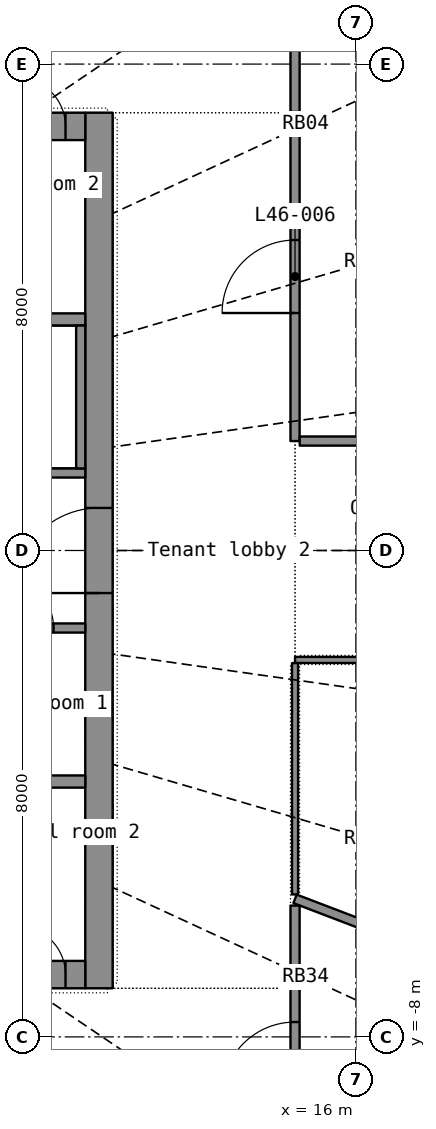
"""IFC4 building model, lengths in metres.
Left out: names, types, materials, properties, quantities, classifications, styles, units other than length and angle.
Written with IfcOpenShell. Run it as: python <this file> out.ifc"""

import sys

from ifc_helpers import new_model, si_unit, direction, frame, frame_2d, origin, place, context, subcontext, project, spatial, rectangle, extrude, element, fill, save


model = new_model("IFC4")
c1 = context("Model", 3, precision=1e-05, world=origin(), true_north=direction((0.0, 1.0)))
c2 = subcontext(c1, "Body", "Model", "MODEL_VIEW")
j1 = project(units=[si_unit("LENGTHUNIT", "METRE"), si_unit("PLANEANGLEUNIT", "RADIAN")], contexts=[c1])
p1 = place(None, origin())
s1 = spatial("IfcSite", under=j1, at=p1, CompositionType="ELEMENT")
p2 = place(p1, origin())
s2 = spatial("IfcBuilding", under=s1, at=p2, CompositionType="ELEMENT")
p3 = place(p2, frame((0.0, 0.0, 190.4)))
s3 = spatial("IfcBuildingStorey", under=s2, at=p3, CompositionType="ELEMENT", Elevation=190.4)
p4 = place(p3, frame((11.775, -7.2, 0.0), z_axis=(0.0, 0.0, 1.0), x_axis=(0.0, 1.0, 0.0)))
e1 = element("IfcWall", 1, at=p4, inside=s3, PredefinedType="SHEAR", context=c2, shape_type="SweptSolid", body=[
    extrude(rectangle(XDim=14.4, YDim=0.45, at=frame_2d((7.2, 0.0))), origin(), (0.0, 0.0, 1.0), 3.3),
])
p5 = place(p4, frame((6.5, 0.0, 0.0)))
e2 = element("IfcOpeningElement", 2, at=p5, cuts=e1, PredefinedType="OPENING", context=c2, shape_type="SweptSolid", body=[
    extrude(rectangle(XDim=1.4, YDim=2.2, at=frame_2d((0.7, 1.1))), frame((0.0, 0.235, 0.0), z_axis=(0.0, -1.0, 0.0), x_axis=(1.0, 0.0, 0.0)), (0.0, 0.0, 1.0), 0.47),
])
p6 = place(p3, frame((-11.55, -6.975, 0.0), z_axis=(0.0, 0.0, 1.0), x_axis=(1.0, 0.0, 0.0)))
e3 = element("IfcWall", 3, at=p6, inside=s3, PredefinedType="SHEAR", context=c2, shape_type="SweptSolid", body=[
    extrude(rectangle(XDim=23.1, YDim=0.45, at=frame_2d((11.55, 0.0))), origin(), (0.0, 0.0, 1.0), 3.3),
])
p7 = place(p6, frame((20.0, 0.0, 0.0)))
e4 = element("IfcOpeningElement", 4, at=p7, cuts=e3, PredefinedType="OPENING", context=c2, shape_type="SweptSolid", body=[
    extrude(rectangle(XDim=1.1, YDim=2.2, at=frame_2d((0.55, 1.1))), frame((0.0, 0.235, 0.0), z_axis=(0.0, -1.0, 0.0), x_axis=(1.0, 0.0, 0.0)), (0.0, 0.0, 1.0), 0.47),
])
p8 = place(p6, frame((3.1, 0.0, 0.0)))
e5 = element("IfcOpeningElement", 5, at=p8, cuts=e3, PredefinedType="OPENING", context=c2, shape_type="SweptSolid", body=[
    extrude(rectangle(XDim=0.9, YDim=2.1, at=frame_2d((0.45, 1.05))), frame((0.0, 0.235, 0.0), z_axis=(0.0, -1.0, 0.0), x_axis=(1.0, 0.0, 0.0)), (0.0, 0.0, 1.0), 0.47),
])
p9 = place(p6, frame((8.1, 0.0, 0.0)))
e6 = element("IfcOpeningElement", 6, at=p9, cuts=e3, PredefinedType="OPENING", context=c2, shape_type="SweptSolid", body=[
    extrude(rectangle(XDim=0.9, YDim=2.1, at=frame_2d((0.45, 1.05))), frame((0.0, 0.235, 0.0), z_axis=(0.0, -1.0, 0.0), x_axis=(1.0, 0.0, 0.0)), (0.0, 0.0, 1.0), 0.47),
])
p10 = place(p6, frame((15.1, 0.0, 0.0)))
e7 = element("IfcOpeningElement", 7, at=p10, cuts=e3, PredefinedType="OPENING", context=c2, shape_type="SweptSolid", body=[
    extrude(rectangle(XDim=0.9, YDim=2.1, at=frame_2d((0.45, 1.05))), frame((0.0, 0.235, 0.0), z_axis=(0.0, -1.0, 0.0), x_axis=(1.0, 0.0, 0.0)), (0.0, 0.0, 1.0), 0.47),
])
p11 = place(p6, frame((0.325, 0.0, 0.0)))
e8 = element("IfcOpeningElement", 8, at=p11, cuts=e3, PredefinedType="OPENING", context=c2, shape_type="SweptSolid", body=[
    extrude(rectangle(XDim=0.8, YDim=2.05, at=frame_2d((0.4, 1.025))), frame((0.0, 0.235, 0.0), z_axis=(0.0, -1.0, 0.0), x_axis=(1.0, 0.0, 0.0)), (0.0, 0.0, 1.0), 0.47),
])
p12 = place(p6, frame((21.975, 0.0, 0.0)))
e9 = element("IfcOpeningElement", 9, at=p12, cuts=e3, PredefinedType="OPENING", context=c2, shape_type="SweptSolid", body=[
    extrude(rectangle(XDim=0.8, YDim=2.05, at=frame_2d((0.4, 1.025))), frame((0.0, 0.235, 0.0), z_axis=(0.0, -1.0, 0.0), x_axis=(1.0, 0.0, 0.0)), (0.0, 0.0, 1.0), 0.47),
])
p13 = place(p3, frame((-11.55, 6.975, 0.0), z_axis=(0.0, 0.0, 1.0), x_axis=(1.0, 0.0, 0.0)))
e10 = element("IfcWall", 10, at=p13, inside=s3, PredefinedType="SHEAR", context=c2, shape_type="SweptSolid", body=[
    extrude(rectangle(XDim=23.1, YDim=0.45, at=frame_2d((11.55, 0.0))), origin(), (0.0, 0.0, 1.0), 3.3),
])
p14 = place(p13, frame((2.0, 0.0, 0.0)))
e11 = element("IfcOpeningElement", 11, at=p14, cuts=e10, PredefinedType="OPENING", context=c2, shape_type="SweptSolid", body=[
    extrude(rectangle(XDim=1.1, YDim=2.2, at=frame_2d((0.55, 1.1))), frame((0.0, 0.235, 0.0), z_axis=(0.0, -1.0, 0.0), x_axis=(1.0, 0.0, 0.0)), (0.0, 0.0, 1.0), 0.47),
])
p15 = place(p13, frame((6.0, 0.0, 0.0)))
e12 = element("IfcOpeningElement", 12, at=p15, cuts=e10, PredefinedType="OPENING", context=c2, shape_type="SweptSolid", body=[
    extrude(rectangle(XDim=1.1, YDim=2.2, at=frame_2d((0.55, 1.1))), frame((0.0, 0.235, 0.0), z_axis=(0.0, -1.0, 0.0), x_axis=(1.0, 0.0, 0.0)), (0.0, 0.0, 1.0), 0.47),
])
p16 = place(p13, frame((8.0, 0.0, 0.0)))
e13 = element("IfcOpeningElement", 13, at=p16, cuts=e10, PredefinedType="OPENING", context=c2, shape_type="SweptSolid", body=[
    extrude(rectangle(XDim=1.1, YDim=2.2, at=frame_2d((0.55, 1.1))), frame((0.0, 0.235, 0.0), z_axis=(0.0, -1.0, 0.0), x_axis=(1.0, 0.0, 0.0)), (0.0, 0.0, 1.0), 0.47),
])
p17 = place(p13, frame((10.0, 0.0, 0.0)))
e14 = element("IfcOpeningElement", 14, at=p17, cuts=e10, PredefinedType="OPENING", context=c2, shape_type="SweptSolid", body=[
    extrude(rectangle(XDim=1.1, YDim=2.2, at=frame_2d((0.55, 1.1))), frame((0.0, 0.235, 0.0), z_axis=(0.0, -1.0, 0.0), x_axis=(1.0, 0.0, 0.0)), (0.0, 0.0, 1.0), 0.47),
])
p18 = place(p13, frame((12.0, 0.0, 0.0)))
e15 = element("IfcOpeningElement", 15, at=p18, cuts=e10, PredefinedType="OPENING", context=c2, shape_type="SweptSolid", body=[
    extrude(rectangle(XDim=1.1, YDim=2.2, at=frame_2d((0.55, 1.1))), frame((0.0, 0.235, 0.0), z_axis=(0.0, -1.0, 0.0), x_axis=(1.0, 0.0, 0.0)), (0.0, 0.0, 1.0), 0.47),
])
p19 = place(p13, frame((14.0, 0.0, 0.0)))
e16 = element("IfcOpeningElement", 16, at=p19, cuts=e10, PredefinedType="OPENING", context=c2, shape_type="SweptSolid", body=[
    extrude(rectangle(XDim=1.1, YDim=2.2, at=frame_2d((0.55, 1.1))), frame((0.0, 0.235, 0.0), z_axis=(0.0, -1.0, 0.0), x_axis=(1.0, 0.0, 0.0)), (0.0, 0.0, 1.0), 0.47),
])
p20 = place(p13, frame((16.0, 0.0, 0.0)))
e17 = element("IfcOpeningElement", 17, at=p20, cuts=e10, PredefinedType="OPENING", context=c2, shape_type="SweptSolid", body=[
    extrude(rectangle(XDim=1.1, YDim=2.2, at=frame_2d((0.55, 1.1))), frame((0.0, 0.235, 0.0), z_axis=(0.0, -1.0, 0.0), x_axis=(1.0, 0.0, 0.0)), (0.0, 0.0, 1.0), 0.47),
])
p21 = place(p13, frame((18.0, 0.0, 0.0)))
e18 = element("IfcOpeningElement", 18, at=p21, cuts=e10, PredefinedType="OPENING", context=c2, shape_type="SweptSolid", body=[
    extrude(rectangle(XDim=1.1, YDim=2.2, at=frame_2d((0.55, 1.1))), frame((0.0, 0.235, 0.0), z_axis=(0.0, -1.0, 0.0), x_axis=(1.0, 0.0, 0.0)), (0.0, 0.0, 1.0), 0.47),
])
p22 = place(p13, frame((20.0, 0.0, 0.0)))
e19 = element("IfcOpeningElement", 19, at=p22, cuts=e10, PredefinedType="OPENING", context=c2, shape_type="SweptSolid", body=[
    extrude(rectangle(XDim=1.1, YDim=2.2, at=frame_2d((0.55, 1.1))), frame((0.0, 0.235, 0.0), z_axis=(0.0, -1.0, 0.0), x_axis=(1.0, 0.0, 0.0)), (0.0, 0.0, 1.0), 0.47),
])
p23 = place(p13, frame((4.1, 0.0, 0.0)))
e20 = element("IfcOpeningElement", 20, at=p23, cuts=e10, PredefinedType="OPENING", context=c2, shape_type="SweptSolid", body=[
    extrude(rectangle(XDim=0.9, YDim=2.1, at=frame_2d((0.45, 1.05))), frame((0.0, 0.235, 0.0), z_axis=(0.0, -1.0, 0.0), x_axis=(1.0, 0.0, 0.0)), (0.0, 0.0, 1.0), 0.47),
])
p24 = place(p13, frame((0.325, 0.0, 0.0)))
e21 = element("IfcOpeningElement", 21, at=p24, cuts=e10, PredefinedType="OPENING", context=c2, shape_type="SweptSolid", body=[
    extrude(rectangle(XDim=0.8, YDim=2.05, at=frame_2d((0.4, 1.025))), frame((0.0, 0.235, 0.0), z_axis=(0.0, -1.0, 0.0), x_axis=(1.0, 0.0, 0.0)), (0.0, 0.0, 1.0), 0.47),
])
p25 = place(p13, frame((21.975, 0.0, 0.0)))
e22 = element("IfcOpeningElement", 22, at=p25, cuts=e10, PredefinedType="OPENING", context=c2, shape_type="SweptSolid", body=[
    extrude(rectangle(XDim=0.8, YDim=2.05, at=frame_2d((0.4, 1.025))), frame((0.0, 0.235, 0.0), z_axis=(0.0, -1.0, 0.0), x_axis=(1.0, 0.0, 0.0)), (0.0, 0.0, 1.0), 0.47),
])
for number, where, z_axis, x_axis in (
    (23, (-11.55, -3.8, 0.0), (0.0, 0.0, 1.0), (1.0, 0.0, 0.0)),
    (24, (-11.55, 3.8, 0.0), (0.0, 0.0, 1.0), (1.0, 0.0, 0.0)),
):
    element("IfcWall", number, at=place(p3, frame(where, z_axis=z_axis, x_axis=x_axis)), inside=s3, PredefinedType="SHEAR", context=c2, shape_type="SweptSolid", body=[
        extrude(rectangle(XDim=23.1, YDim=0.2, at=frame_2d((11.55, 0.0))), origin(), (0.0, 0.0, 1.0), 3.3),
    ])
p26 = place(p3, frame((3.0, -1.275, 0.0), z_axis=(0.0, 0.0, 1.0), x_axis=(1.0, 0.0, 0.0)))
e25 = element("IfcWall", 25, at=p26, inside=s3, PredefinedType="PARTITIONING", context=c2, shape_type="SweptSolid", body=[
    extrude(rectangle(XDim=8.55, YDim=0.15, at=frame_2d((4.275, 0.0))), origin(), (0.0, 0.0, 1.0), 3.3),
])
p27 = place(p26, frame((0.628, 0.0, 0.0)))
e26 = element("IfcOpeningElement", 26, at=p27, cuts=e25, PredefinedType="OPENING", context=c2, shape_type="SweptSolid", body=[
    extrude(rectangle(XDim=0.85, YDim=2.1, at=frame_2d((0.425, 1.05))), frame((0.0, 0.085, 0.0), z_axis=(0.0, -1.0, 0.0), x_axis=(1.0, 0.0, 0.0)), (0.0, 0.0, 1.0), 0.17),
])
p28 = place(p26, frame((2.884, 0.0, 0.0)))
e27 = element("IfcOpeningElement", 27, at=p28, cuts=e25, PredefinedType="OPENING", context=c2, shape_type="SweptSolid", body=[
    extrude(rectangle(XDim=0.85, YDim=2.1, at=frame_2d((0.425, 1.05))), frame((0.0, 0.085, 0.0), z_axis=(0.0, -1.0, 0.0), x_axis=(1.0, 0.0, 0.0)), (0.0, 0.0, 1.0), 0.17),
])
p29 = place(p26, frame((5.034, 0.0, 0.0)))
e28 = element("IfcOpeningElement", 28, at=p29, cuts=e25, PredefinedType="OPENING", context=c2, shape_type="SweptSolid", body=[
    extrude(rectangle(XDim=0.9, YDim=2.1, at=frame_2d((0.45, 1.05))), frame((0.0, 0.085, 0.0), z_axis=(0.0, -1.0, 0.0), x_axis=(1.0, 0.0, 0.0)), (0.0, 0.0, 1.0), 0.17),
])
p30 = place(p26, frame((7.128, 0.0, 0.0)))
e29 = element("IfcOpeningElement", 29, at=p30, cuts=e25, PredefinedType="OPENING", context=c2, shape_type="SweptSolid", body=[
    extrude(rectangle(XDim=0.9, YDim=2.1, at=frame_2d((0.45, 1.05))), frame((0.0, 0.085, 0.0), z_axis=(0.0, -1.0, 0.0), x_axis=(1.0, 0.0, 0.0)), (0.0, 0.0, 1.0), 0.17),
])
p31 = place(p3, frame((3.0, 1.275, 0.0), z_axis=(0.0, 0.0, 1.0), x_axis=(1.0, 0.0, 0.0)))
e30 = element("IfcWall", 30, at=p31, inside=s3, PredefinedType="SHEAR", context=c2, shape_type="SweptSolid", body=[
    extrude(rectangle(XDim=8.55, YDim=0.15, at=frame_2d((4.275, 0.0))), origin(), (0.0, 0.0, 1.0), 3.3),
])
p32 = place(p31, frame((2.05, 0.0, 0.0)))
e31 = element("IfcOpeningElement", 31, at=p32, cuts=e30, PredefinedType="OPENING", context=c2, shape_type="SweptSolid", body=[
    extrude(rectangle(XDim=1.1, YDim=2.15, at=frame_2d((0.55, 1.075))), frame((0.0, 0.085, 0.0), z_axis=(0.0, -1.0, 0.0), x_axis=(1.0, 0.0, 0.0)), (0.0, 0.0, 1.0), 0.17),
])
p33 = place(p31, frame((0.45, 0.0, 0.0)))
e32 = element("IfcOpeningElement", 32, at=p33, cuts=e30, PredefinedType="OPENING", context=c2, shape_type="SweptSolid", body=[
    extrude(rectangle(XDim=0.9, YDim=2.1, at=frame_2d((0.45, 1.05))), frame((0.0, 0.085, 0.0), z_axis=(0.0, -1.0, 0.0), x_axis=(1.0, 0.0, 0.0)), (0.0, 0.0, 1.0), 0.17),
])
p34 = place(p3, frame((11.475, 1.35, 0.0), z_axis=(0.0, 0.0, 1.0), x_axis=(0.0, 1.0, 0.0)))
e33 = element("IfcWall", 33, at=p34, inside=s3, PredefinedType="SHEAR", context=c2, shape_type="SweptSolid", body=[
    extrude(rectangle(XDim=2.35, YDim=0.15, at=frame_2d((1.175, 0.0))), origin(), (0.0, 0.0, 1.0), 3.3),
])
p35 = place(p3, frame((20.515, -7.836, 0.0), z_axis=(0.0, 0.0, 1.0), x_axis=(-0.934186062, 0.356786213, 0.0)))
e34 = element("IfcWall", 34, at=p35, inside=s3, PredefinedType="PARTITIONING", context=c2, shape_type="SweptSolid", body=[
    extrude(rectangle(XDim=5.904, YDim=0.15, at=frame_2d((2.952, 0.0))), origin(), (0.0, 0.0, 1.0), 2.4),
])
p36 = place(p3, frame((15.0, 1.8, 0.0), z_axis=(0.0, 0.0, 1.0), x_axis=(0.0, 1.0, 0.0)))
e35 = element("IfcWall", 35, at=p36, inside=s3, PredefinedType="PARTITIONING", context=c2, shape_type="SweptSolid", body=[
    extrude(rectangle(XDim=5.412, YDim=0.15, at=frame_2d((2.706, 0.0))), origin(), (0.0, 0.0, 1.0), 2.4),
])
p37 = place(p36, frame((2.106, 0.0, 0.0)))
e36 = element("IfcOpeningElement", 36, at=p37, cuts=e35, PredefinedType="OPENING", context=c2, shape_type="SweptSolid", body=[
    extrude(rectangle(XDim=1.2, YDim=2.2, at=frame_2d((0.6, 1.1))), frame((0.0, 0.085, 0.0), z_axis=(0.0, -1.0, 0.0), x_axis=(1.0, 0.0, 0.0)), (0.0, 0.0, 1.0), 0.17),
])
p38 = place(p3, frame((15.0, -1.8, 0.0), z_axis=(0.0, 0.0, 1.0), x_axis=(1.0, 0.0, 0.0)))
e37 = element("IfcWall", 37, at=p38, inside=s3, PredefinedType="PARTITIONING", context=c2, shape_type="SweptSolid", body=[
    extrude(rectangle(XDim=4.992, YDim=0.1, at=frame_2d((2.496, 0.0))), origin(), (0.0, 0.0, 1.0), 2.4),
])
p39 = place(p38, frame((1.746, 0.0, 0.0)))
e38 = element("IfcOpeningElement", 38, at=p39, cuts=e37, PredefinedType="OPENING", context=c2, shape_type="SweptSolid", body=[
    extrude(rectangle(XDim=1.5, YDim=2.4, at=frame_2d((0.75, 1.2))), frame((0.0, 0.06, 0.0), z_axis=(0.0, -1.0, 0.0), x_axis=(1.0, 0.0, 0.0)), (0.0, 0.0, 1.0), 0.12),
])
p40 = place(p3, frame((19.992, 1.8, 0.0), z_axis=(0.0, 0.0, 1.0), x_axis=(-1.0, 0.0, 0.0)))
e39 = element("IfcWall", 39, at=p40, inside=s3, PredefinedType="PARTITIONING", context=c2, shape_type="SweptSolid", body=[
    extrude(rectangle(XDim=4.915, YDim=0.15, at=frame_2d((2.458, 0.0))), origin(), (0.0, 0.0, 1.0), 2.4),
])
p41 = place(p3, frame((15.0, -5.657, 0.0), z_axis=(0.0, 0.0, 1.0), x_axis=(0.0, 1.0, 0.0)))
e40 = element("IfcWall", 40, at=p41, inside=s3, PredefinedType="PARTITIONING", context=c2, shape_type="SweptSolid", body=[
    extrude(rectangle(XDim=3.805, YDim=0.1, at=frame_2d((1.903, 0.0))), origin(), (0.0, 0.0, 1.0), 2.4),
])
p42 = place(p3, frame((15.0, -9.523, 0.0), z_axis=(0.0, 0.0, 1.0), x_axis=(0.0, 1.0, 0.0)))
e41 = element("IfcWall", 41, at=p42, inside=s3, PredefinedType="PARTITIONING", context=c2, shape_type="SweptSolid", body=[
    extrude(rectangle(XDim=2.335, YDim=0.15, at=frame_2d((1.167, 0.0))), origin(), (0.0, 0.0, 1.0), 2.4),
])
p43 = place(p42, frame((0.567, 0.0, 0.0)))
e42 = element("IfcOpeningElement", 42, at=p43, cuts=e41, PredefinedType="OPENING", context=c2, shape_type="SweptSolid", body=[
    extrude(rectangle(XDim=1.2, YDim=2.2, at=frame_2d((0.6, 1.1))), frame((0.0, 0.085, 0.0), z_axis=(0.0, -1.0, 0.0), x_axis=(1.0, 0.0, 0.0)), (0.0, 0.0, 1.0), 0.17),
])
p44 = place(p3, frame((15.0, -7.187, 0.0), z_axis=(0.0, 0.0, 1.0), x_axis=(0.0, 1.0, 0.0)))
e43 = element("IfcWall", 43, at=p44, inside=s3, PredefinedType="PARTITIONING", context=c2, shape_type="SweptSolid", body=[
    extrude(rectangle(XDim=1.347, YDim=0.15, at=frame_2d((0.673, 0.0))), origin(), (0.0, 0.0, 1.0), 2.4),
])
p45 = place(p3, frame((15.0, 7.213, 0.0), z_axis=(0.0, 0.0, 1.0), x_axis=(0.0, 1.0, 0.0)))
e44 = element("IfcWall", 44, at=p45, inside=s3, PredefinedType="PARTITIONING", context=c2, shape_type="SweptSolid", body=[
    extrude(rectangle(XDim=1.323, YDim=0.15, at=frame_2d((0.662, 0.0))), origin(), (0.0, 0.0, 1.0), 2.4),
])
p46 = place(p12, origin())
e45 = element("IfcDoor", 45, at=p46, inside=s3, OperationType="SINGLE_SWING_LEFT", PredefinedType="DOOR", context=c2, shape_type="SweptSolid", body=[
    extrude(rectangle(XDim=0.8, YDim=2.05, at=frame_2d((0.4, 1.025))), frame((0.0, 0.025, 0.0), z_axis=(0.0, -1.0, 0.0), x_axis=(1.0, 0.0, 0.0)), (0.0, 0.0, 1.0), 0.05),
])
fill(e9, e45)
p47 = place(p25, origin())
e46 = element("IfcDoor", 46, at=p47, inside=s3, OperationType="SINGLE_SWING_LEFT", PredefinedType="DOOR", context=c2, shape_type="SweptSolid", body=[
    extrude(rectangle(XDim=0.8, YDim=2.05, at=frame_2d((0.4, 1.025))), frame((0.0, 0.025, 0.0), z_axis=(0.0, -1.0, 0.0), x_axis=(1.0, 0.0, 0.0)), (0.0, 0.0, 1.0), 0.05),
])
fill(e22, e46)
p48 = place(p5, origin())
e47 = element("IfcDoor", 47, at=p48, inside=s3, OperationType="DOUBLE_DOOR_SINGLE_SWING", PredefinedType="DOOR", context=c2, shape_type="SweptSolid", body=[
    extrude(rectangle(XDim=1.4, YDim=2.2, at=frame_2d((0.7, 1.1))), frame((0.0, 0.025, 0.0), z_axis=(0.0, -1.0, 0.0), x_axis=(1.0, 0.0, 0.0)), (0.0, 0.0, 1.0), 0.05),
])
fill(e2, e47)
p49 = place(p30, origin())
e48 = element("IfcDoor", 48, at=p49, inside=s3, OperationType="SINGLE_SWING_LEFT", PredefinedType="DOOR", context=c2, shape_type="SweptSolid", body=[
    extrude(rectangle(XDim=0.9, YDim=2.1, at=frame_2d((0.45, 1.05))), frame((0.0, 0.025, 0.0), z_axis=(0.0, -1.0, 0.0), x_axis=(1.0, 0.0, 0.0)), (0.0, 0.0, 1.0), 0.05),
])
fill(e29, e48)
p50 = place(p43, origin())
e49 = element("IfcDoor", 49, at=p50, inside=s3, OperationType="DOUBLE_DOOR_SINGLE_SWING", PredefinedType="DOOR", context=c2, shape_type="SweptSolid", body=[
    extrude(rectangle(XDim=1.2, YDim=2.2, at=frame_2d((0.6, 1.1))), frame((0.0, 0.025, 0.0), z_axis=(0.0, -1.0, 0.0), x_axis=(1.0, 0.0, 0.0)), (0.0, 0.0, 1.0), 0.05),
])
fill(e42, e49)
p51 = place(p37, origin())
e50 = element("IfcDoor", 50, at=p51, inside=s3, OperationType="DOUBLE_DOOR_SINGLE_SWING", PredefinedType="DOOR", context=c2, shape_type="SweptSolid", body=[
    extrude(rectangle(XDim=1.2, YDim=2.2, at=frame_2d((0.6, 1.1))), frame((0.0, 0.025, 0.0), z_axis=(0.0, -1.0, 0.0), x_axis=(1.0, 0.0, 0.0)), (0.0, 0.0, 1.0), 0.05),
])
fill(e36, e50)
save(model, sys.argv[1])
